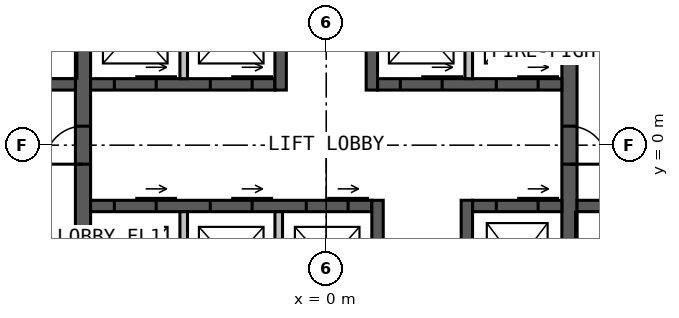
"""IFC4 building model, lengths in metres.
Left out: names, types, materials, properties, quantities, classifications, styles, units other than length and angle.
Written with IfcOpenShell. Run it as: python <this file> out.ifc"""

import sys

from ifc_helpers import new_model, si_unit, direction, frame, frame_2d, origin, place, context, subcontext, project, spatial, rectangle, extrude, element, fill, save


model = new_model("IFC4")
c1 = context("Model", 3, precision=1e-05, world=origin(), true_north=direction((0.0, 1.0)))
c2 = subcontext(c1, "Body", "Model", "MODEL_VIEW")
j1 = project(units=[si_unit("LENGTHUNIT", "METRE"), si_unit("PLANEANGLEUNIT", "RADIAN")], contexts=[c1])
p1 = place(None, origin())
s1 = spatial("IfcSite", under=j1, at=p1, CompositionType="ELEMENT")
p2 = place(p1, origin())
s2 = spatial("IfcBuilding", under=s1, at=p2, CompositionType="ELEMENT")
p3 = place(p2, origin())
s3 = spatial("IfcBuildingStorey", under=s2, at=p3, CompositionType="ELEMENT", Elevation=0.0)
p4 = place(p3, frame((-6.4, -9.1, 0.0), z_axis=(0.0, 0.0, 1.0), x_axis=(0.0, 1.0, 0.0)))
e1 = element("IfcWall", 1, at=p4, inside=s3, PredefinedType="SOLIDWALL", context=c2, shape_type="SweptSolid", body=[
    extrude(rectangle(XDim=18.2, YDim=0.4, at=frame_2d((9.1, 0.0))), origin(), (0.0, 0.0, 1.0), 6.0),
])
p5 = place(p4, frame((8.6, 0.0, 0.0)))
e2 = element("IfcOpeningElement", 2, at=p5, cuts=e1, PredefinedType="OPENING", context=c2, shape_type="SweptSolid", body=[
    extrude(rectangle(XDim=1.0, YDim=2.2, at=frame_2d((0.5, 1.1))), frame((0.0, 0.21, 0.0), z_axis=(0.0, -1.0, 0.0), x_axis=(1.0, 0.0, 0.0)), (0.0, 0.0, 1.0), 0.42),
])
p6 = place(p3, frame((6.4, 9.1, 0.0), z_axis=(0.0, 0.0, 1.0), x_axis=(0.0, -1.0, 0.0)))
e3 = element("IfcWall", 3, at=p6, inside=s3, PredefinedType="SOLIDWALL", context=c2, shape_type="SweptSolid", body=[
    extrude(rectangle(XDim=18.2, YDim=0.4, at=frame_2d((9.1, 0.0))), origin(), (0.0, 0.0, 1.0), 6.0),
])
p7 = place(p6, frame((8.6, 0.0, 0.0)))
e4 = element("IfcOpeningElement", 4, at=p7, cuts=e3, PredefinedType="OPENING", context=c2, shape_type="SweptSolid", body=[
    extrude(rectangle(XDim=1.0, YDim=2.2, at=frame_2d((0.5, 1.1))), frame((0.0, 0.21, 0.0), z_axis=(0.0, -1.0, 0.0), x_axis=(1.0, 0.0, 0.0)), (0.0, 0.0, 1.0), 0.42),
])
p8 = place(p3, frame((-6.2, 1.6, 0.0), z_axis=(0.0, 0.0, 1.0), x_axis=(1.0, 0.0, 0.0)))
e5 = element("IfcWall", 5, at=p8, inside=s3, PredefinedType="SOLIDWALL", context=c2, shape_type="SweptSolid", body=[
    extrude(rectangle(XDim=4.85, YDim=0.3, at=frame_2d((2.425, 0.0))), origin(), (0.0, 0.0, 1.0), 6.0),
])
p9 = place(p8, frame((0.625, 0.0, 0.0)))
e6 = element("IfcOpeningElement", 6, at=p9, cuts=e5, PredefinedType="OPENING", context=c2, shape_type="SweptSolid", body=[
    extrude(rectangle(XDim=1.1, YDim=2.2, at=frame_2d((0.55, 1.1))), frame((0.0, 0.16, 0.0), z_axis=(0.0, -1.0, 0.0), x_axis=(1.0, 0.0, 0.0)), (0.0, 0.0, 1.0), 0.32),
])
p10 = place(p8, frame((3.15, 0.0, 0.0)))
e7 = element("IfcOpeningElement", 7, at=p10, cuts=e5, PredefinedType="OPENING", context=c2, shape_type="SweptSolid", body=[
    extrude(rectangle(XDim=1.1, YDim=2.2, at=frame_2d((0.55, 1.1))), frame((0.0, 0.16, 0.0), z_axis=(0.0, -1.0, 0.0), x_axis=(1.0, 0.0, 0.0)), (0.0, 0.0, 1.0), 0.32),
])
p11 = place(p3, frame((1.35, 1.6, 0.0), z_axis=(0.0, 0.0, 1.0), x_axis=(1.0, 0.0, 0.0)))
e8 = element("IfcWall", 8, at=p11, inside=s3, PredefinedType="SOLIDWALL", context=c2, shape_type="SweptSolid", body=[
    extrude(rectangle(XDim=4.85, YDim=0.3, at=frame_2d((2.425, 0.0))), origin(), (0.0, 0.0, 1.0), 6.0),
])
p12 = place(p11, frame((0.6, 0.0, 0.0)))
e9 = element("IfcOpeningElement", 9, at=p12, cuts=e8, PredefinedType="OPENING", context=c2, shape_type="SweptSolid", body=[
    extrude(rectangle(XDim=1.1, YDim=2.2, at=frame_2d((0.55, 1.1))), frame((0.0, 0.16, 0.0), z_axis=(0.0, -1.0, 0.0), x_axis=(1.0, 0.0, 0.0)), (0.0, 0.0, 1.0), 0.32),
])
p13 = place(p11, frame((3.125, 0.0, 0.0)))
e10 = element("IfcOpeningElement", 10, at=p13, cuts=e8, PredefinedType="OPENING", context=c2, shape_type="SweptSolid", body=[
    extrude(rectangle(XDim=1.1, YDim=2.2, at=frame_2d((0.55, 1.1))), frame((0.0, 0.16, 0.0), z_axis=(0.0, -1.0, 0.0), x_axis=(1.0, 0.0, 0.0)), (0.0, 0.0, 1.0), 0.32),
])
p14 = place(p3, frame((-1.2, 1.45, 0.0), z_axis=(0.0, 0.0, 1.0), x_axis=(0.0, 1.0, 0.0)))
e11 = element("IfcWall", 11, at=p14, inside=s3, PredefinedType="SOLIDWALL", context=c2, shape_type="SweptSolid", body=[
    extrude(rectangle(XDim=7.65, YDim=0.3, at=frame_2d((3.825, 0.0))), origin(), (0.0, 0.0, 1.0), 6.0),
])
p15 = place(p14, frame((5.05, 0.0, 0.0)))
e12 = element("IfcOpeningElement", 12, at=p15, cuts=e11, PredefinedType="OPENING", context=c2, shape_type="SweptSolid", body=[
    extrude(rectangle(XDim=1.0, YDim=2.2, at=frame_2d((0.5, 1.1))), frame((0.0, 0.16, 0.0), z_axis=(0.0, -1.0, 0.0), x_axis=(1.0, 0.0, 0.0)), (0.0, 0.0, 1.0), 0.32),
])
p16 = place(p3, frame((1.2, 1.45, 0.0), z_axis=(0.0, 0.0, 1.0), x_axis=(0.0, 1.0, 0.0)))
e13 = element("IfcWall", 13, at=p16, inside=s3, PredefinedType="SOLIDWALL", context=c2, shape_type="SweptSolid", body=[
    extrude(rectangle(XDim=7.65, YDim=0.3, at=frame_2d((3.825, 0.0))), origin(), (0.0, 0.0, 1.0), 6.0),
])
p17 = place(p16, frame((3.8, 0.0, 0.0)))
e14 = element("IfcOpeningElement", 14, at=p17, cuts=e13, PredefinedType="OPENING", context=c2, shape_type="SweptSolid", body=[
    extrude(rectangle(XDim=1.0, YDim=2.2, at=frame_2d((0.5, 1.1))), frame((0.0, 0.16, 0.0), z_axis=(0.0, -1.0, 0.0), x_axis=(1.0, 0.0, 0.0)), (0.0, 0.0, 1.0), 0.32),
])
p18 = place(p16, frame((6.15, 0.0, 0.0)))
e15 = element("IfcOpeningElement", 15, at=p18, cuts=e13, PredefinedType="OPENING", context=c2, shape_type="SweptSolid", body=[
    extrude(rectangle(XDim=1.0, YDim=2.2, at=frame_2d((0.5, 1.1))), frame((0.0, 0.16, 0.0), z_axis=(0.0, -1.0, 0.0), x_axis=(1.0, 0.0, 0.0)), (0.0, 0.0, 1.0), 0.32),
])
p19 = place(p3, frame((-6.2, -1.6, 0.0), z_axis=(0.0, 0.0, 1.0), x_axis=(1.0, 0.0, 0.0)))
e16 = element("IfcWall", 16, at=p19, inside=s3, PredefinedType="SOLIDWALL", context=c2, shape_type="SweptSolid", body=[
    extrude(rectangle(XDim=7.4, YDim=0.3, at=frame_2d((3.7, 0.0))), origin(), (0.0, 0.0, 1.0), 6.0),
])
p20 = place(p19, frame((0.625, 0.0, 0.0)))
e17 = element("IfcOpeningElement", 17, at=p20, cuts=e16, PredefinedType="OPENING", context=c2, shape_type="SweptSolid", body=[
    extrude(rectangle(XDim=1.1, YDim=2.2, at=frame_2d((0.55, 1.1))), frame((0.0, 0.16, 0.0), z_axis=(0.0, -1.0, 0.0), x_axis=(1.0, 0.0, 0.0)), (0.0, 0.0, 1.0), 0.32),
])
p21 = place(p19, frame((3.15, 0.0, 0.0)))
e18 = element("IfcOpeningElement", 18, at=p21, cuts=e16, PredefinedType="OPENING", context=c2, shape_type="SweptSolid", body=[
    extrude(rectangle(XDim=1.1, YDim=2.2, at=frame_2d((0.55, 1.1))), frame((0.0, 0.16, 0.0), z_axis=(0.0, -1.0, 0.0), x_axis=(1.0, 0.0, 0.0)), (0.0, 0.0, 1.0), 0.32),
])
p22 = place(p19, frame((5.675, 0.0, 0.0)))
e19 = element("IfcOpeningElement", 19, at=p22, cuts=e16, PredefinedType="OPENING", context=c2, shape_type="SweptSolid", body=[
    extrude(rectangle(XDim=1.1, YDim=2.2, at=frame_2d((0.55, 1.1))), frame((0.0, 0.16, 0.0), z_axis=(0.0, -1.0, 0.0), x_axis=(1.0, 0.0, 0.0)), (0.0, 0.0, 1.0), 0.32),
])
p23 = place(p3, frame((3.85, -1.6, 0.0), z_axis=(0.0, 0.0, 1.0), x_axis=(1.0, 0.0, 0.0)))
e20 = element("IfcWall", 20, at=p23, inside=s3, PredefinedType="SOLIDWALL", context=c2, shape_type="SweptSolid", body=[
    extrude(rectangle(XDim=2.35, YDim=0.3, at=frame_2d((1.175, 0.0))), origin(), (0.0, 0.0, 1.0), 6.0),
])
p24 = place(p23, frame((0.625, 0.0, 0.0)))
e21 = element("IfcOpeningElement", 21, at=p24, cuts=e20, PredefinedType="OPENING", context=c2, shape_type="SweptSolid", body=[
    extrude(rectangle(XDim=1.1, YDim=2.2, at=frame_2d((0.55, 1.1))), frame((0.0, 0.16, 0.0), z_axis=(0.0, -1.0, 0.0), x_axis=(1.0, 0.0, 0.0)), (0.0, 0.0, 1.0), 0.32),
])
p25 = place(p3, frame((1.35, -1.45, 0.0), z_axis=(0.0, 0.0, 1.0), x_axis=(0.0, -1.0, 0.0)))
e22 = element("IfcWall", 22, at=p25, inside=s3, PredefinedType="SOLIDWALL", context=c2, shape_type="SweptSolid", body=[
    extrude(rectangle(XDim=7.65, YDim=0.3, at=frame_2d((3.825, 0.0))), origin(), (0.0, 0.0, 1.0), 6.0),
])
p26 = place(p25, frame((5.75, 0.0, 0.0)))
e23 = element("IfcOpeningElement", 23, at=p26, cuts=e22, PredefinedType="OPENING", context=c2, shape_type="SweptSolid", body=[
    extrude(rectangle(XDim=1.0, YDim=2.2, at=frame_2d((0.5, 1.1))), frame((0.0, 0.16, 0.0), z_axis=(0.0, -1.0, 0.0), x_axis=(1.0, 0.0, 0.0)), (0.0, 0.0, 1.0), 0.32),
])
p27 = place(p25, frame((3.525, 0.0, 0.0)))
e24 = element("IfcOpeningElement", 24, at=p27, cuts=e22, PredefinedType="OPENING", context=c2, shape_type="SweptSolid", body=[
    extrude(rectangle(XDim=0.9, YDim=2.2, at=frame_2d((0.45, 1.1))), frame((0.0, 0.16, 0.0), z_axis=(0.0, -1.0, 0.0), x_axis=(1.0, 0.0, 0.0)), (0.0, 0.0, 1.0), 0.32),
])
p28 = place(p3, frame((3.7, -1.45, 0.0), z_axis=(0.0, 0.0, 1.0), x_axis=(0.0, -1.0, 0.0)))
e25 = element("IfcWall", 25, at=p28, inside=s3, PredefinedType="SOLIDWALL", context=c2, shape_type="SweptSolid", body=[
    extrude(rectangle(XDim=7.65, YDim=0.3, at=frame_2d((3.825, 0.0))), origin(), (0.0, 0.0, 1.0), 6.0),
])
p29 = place(p28, frame((5.1, 0.0, 0.0)))
e26 = element("IfcOpeningElement", 26, at=p29, cuts=e25, PredefinedType="OPENING", context=c2, shape_type="SweptSolid", body=[
    extrude(rectangle(XDim=0.9, YDim=2.2, at=frame_2d((0.45, 1.1))), frame((0.0, 0.16, 0.0), z_axis=(0.0, -1.0, 0.0), x_axis=(1.0, 0.0, 0.0)), (0.0, 0.0, 1.0), 0.32),
])
p30 = place(p3, frame((-9.1, 1.6, 0.0), z_axis=(0.0, 0.0, 1.0), x_axis=(1.0, 0.0, 0.0)))
e27 = element("IfcWall", 27, at=p30, inside=s3, PredefinedType="SOLIDWALL", context=c2, shape_type="SweptSolid", body=[
    extrude(rectangle(XDim=2.5, YDim=0.3, at=frame_2d((1.25, 0.0))), origin(), (0.0, 0.0, 1.0), 6.0),
])
p31 = place(p30, frame((0.75, 0.0, 0.0)))
e28 = element("IfcOpeningElement", 28, at=p31, cuts=e27, PredefinedType="OPENING", context=c2, shape_type="SweptSolid", body=[
    extrude(rectangle(XDim=1.0, YDim=2.2, at=frame_2d((0.5, 1.1))), frame((0.0, 0.16, 0.0), z_axis=(0.0, -1.0, 0.0), x_axis=(1.0, 0.0, 0.0)), (0.0, 0.0, 1.0), 0.32),
])
p32 = place(p3, frame((6.6, -1.6, 0.0), z_axis=(0.0, 0.0, 1.0), x_axis=(1.0, 0.0, 0.0)))
e29 = element("IfcWall", 29, at=p32, inside=s3, PredefinedType="SOLIDWALL", context=c2, shape_type="SweptSolid", body=[
    extrude(rectangle(XDim=2.5, YDim=0.3, at=frame_2d((1.25, 0.0))), origin(), (0.0, 0.0, 1.0), 6.0),
])
p33 = place(p32, frame((0.75, 0.0, 0.0)))
e30 = element("IfcOpeningElement", 30, at=p33, cuts=e29, PredefinedType="OPENING", context=c2, shape_type="SweptSolid", body=[
    extrude(rectangle(XDim=1.0, YDim=2.2, at=frame_2d((0.5, 1.1))), frame((0.0, 0.16, 0.0), z_axis=(0.0, -1.0, 0.0), x_axis=(1.0, 0.0, 0.0)), (0.0, 0.0, 1.0), 0.32),
])
for number, where, z_axis, x_axis in (
    (31, (-3.75, 1.75, 0.0), (0.0, 0.0, 1.0), (0.0, 1.0, 0.0)),
    (32, (3.75, 1.75, 0.0), (0.0, 0.0, 1.0), (0.0, 1.0, 0.0)),
    (33, (-3.75, -1.75, 0.0), (0.0, 0.0, 1.0), (0.0, -1.0, 0.0)),
    (34, (-1.25, -1.75, 0.0), (0.0, 0.0, 1.0), (0.0, -1.0, 0.0)),
):
    element("IfcWall", number, at=place(p3, frame(where, z_axis=z_axis, x_axis=x_axis)), inside=s3, PredefinedType="SOLIDWALL", context=c2, shape_type="SweptSolid", body=[
        extrude(rectangle(XDim=2.7, YDim=0.2, at=frame_2d((1.35, 0.0))), origin(), (0.0, 0.0, 1.0), 5.75),
    ])
p34 = place(p5, origin())
e35 = element("IfcDoor", 35, at=p34, inside=s3, OperationType="SINGLE_SWING_LEFT", PredefinedType="DOOR", context=c2, shape_type="SweptSolid", body=[
    extrude(rectangle(XDim=1.0, YDim=2.2, at=frame_2d((0.5, 1.1))), frame((0.0, 0.025, 0.0), z_axis=(0.0, -1.0, 0.0), x_axis=(1.0, 0.0, 0.0)), (0.0, 0.0, 1.0), 0.05),
])
fill(e2, e35)
p35 = place(p7, origin())
e36 = element("IfcDoor", 36, at=p35, inside=s3, OperationType="SINGLE_SWING_RIGHT", PredefinedType="DOOR", context=c2, shape_type="SweptSolid", body=[
    extrude(rectangle(XDim=1.0, YDim=2.2, at=frame_2d((0.5, 1.1))), frame((0.0, 0.025, 0.0), z_axis=(0.0, -1.0, 0.0), x_axis=(1.0, 0.0, 0.0)), (0.0, 0.0, 1.0), 0.05),
])
fill(e4, e36)
p36 = place(p9, origin())
e37 = element("IfcDoor", 37, at=p36, inside=s3, OperationType="SLIDING_TO_LEFT", PredefinedType="DOOR", context=c2, shape_type="SweptSolid", body=[
    extrude(rectangle(XDim=1.1, YDim=2.2, at=frame_2d((0.55, 1.1))), frame((0.0, 0.025, 0.0), z_axis=(0.0, -1.0, 0.0), x_axis=(1.0, 0.0, 0.0)), (0.0, 0.0, 1.0), 0.05),
])
fill(e6, e37)
p37 = place(p10, origin())
e38 = element("IfcDoor", 38, at=p37, inside=s3, OperationType="SLIDING_TO_LEFT", PredefinedType="DOOR", context=c2, shape_type="SweptSolid", body=[
    extrude(rectangle(XDim=1.1, YDim=2.2, at=frame_2d((0.55, 1.1))), frame((0.0, 0.025, 0.0), z_axis=(0.0, -1.0, 0.0), x_axis=(1.0, 0.0, 0.0)), (0.0, 0.0, 1.0), 0.05),
])
fill(e7, e38)
p38 = place(p12, origin())
e39 = element("IfcDoor", 39, at=p38, inside=s3, OperationType="SLIDING_TO_LEFT", PredefinedType="DOOR", context=c2, shape_type="SweptSolid", body=[
    extrude(rectangle(XDim=1.1, YDim=2.2, at=frame_2d((0.55, 1.1))), frame((0.0, 0.025, 0.0), z_axis=(0.0, -1.0, 0.0), x_axis=(1.0, 0.0, 0.0)), (0.0, 0.0, 1.0), 0.05),
])
fill(e9, e39)
p39 = place(p13, origin())
e40 = element("IfcDoor", 40, at=p39, inside=s3, OperationType="SLIDING_TO_LEFT", PredefinedType="DOOR", context=c2, shape_type="SweptSolid", body=[
    extrude(rectangle(XDim=1.1, YDim=2.2, at=frame_2d((0.55, 1.1))), frame((0.0, 0.025, 0.0), z_axis=(0.0, -1.0, 0.0), x_axis=(1.0, 0.0, 0.0)), (0.0, 0.0, 1.0), 0.05),
])
fill(e10, e40)
p40 = place(p20, origin())
e41 = element("IfcDoor", 41, at=p40, inside=s3, OperationType="SLIDING_TO_LEFT", PredefinedType="DOOR", context=c2, shape_type="SweptSolid", body=[
    extrude(rectangle(XDim=1.1, YDim=2.2, at=frame_2d((0.55, 1.1))), frame((0.0, 0.025, 0.0), z_axis=(0.0, -1.0, 0.0), x_axis=(1.0, 0.0, 0.0)), (0.0, 0.0, 1.0), 0.05),
])
fill(e17, e41)
p41 = place(p21, origin())
e42 = element("IfcDoor", 42, at=p41, inside=s3, OperationType="SLIDING_TO_LEFT", PredefinedType="DOOR", context=c2, shape_type="SweptSolid", body=[
    extrude(rectangle(XDim=1.1, YDim=2.2, at=frame_2d((0.55, 1.1))), frame((0.0, 0.025, 0.0), z_axis=(0.0, -1.0, 0.0), x_axis=(1.0, 0.0, 0.0)), (0.0, 0.0, 1.0), 0.05),
])
fill(e18, e42)
p42 = place(p22, origin())
e43 = element("IfcDoor", 43, at=p42, inside=s3, OperationType="SLIDING_TO_LEFT", PredefinedType="DOOR", context=c2, shape_type="SweptSolid", body=[
    extrude(rectangle(XDim=1.1, YDim=2.2, at=frame_2d((0.55, 1.1))), frame((0.0, 0.025, 0.0), z_axis=(0.0, -1.0, 0.0), x_axis=(1.0, 0.0, 0.0)), (0.0, 0.0, 1.0), 0.05),
])
fill(e19, e43)
p43 = place(p24, origin())
e44 = element("IfcDoor", 44, at=p43, inside=s3, OperationType="SLIDING_TO_LEFT", PredefinedType="DOOR", context=c2, shape_type="SweptSolid", body=[
    extrude(rectangle(XDim=1.1, YDim=2.2, at=frame_2d((0.55, 1.1))), frame((0.0, 0.025, 0.0), z_axis=(0.0, -1.0, 0.0), x_axis=(1.0, 0.0, 0.0)), (0.0, 0.0, 1.0), 0.05),
])
fill(e21, e44)
save(model, sys.argv[1])
